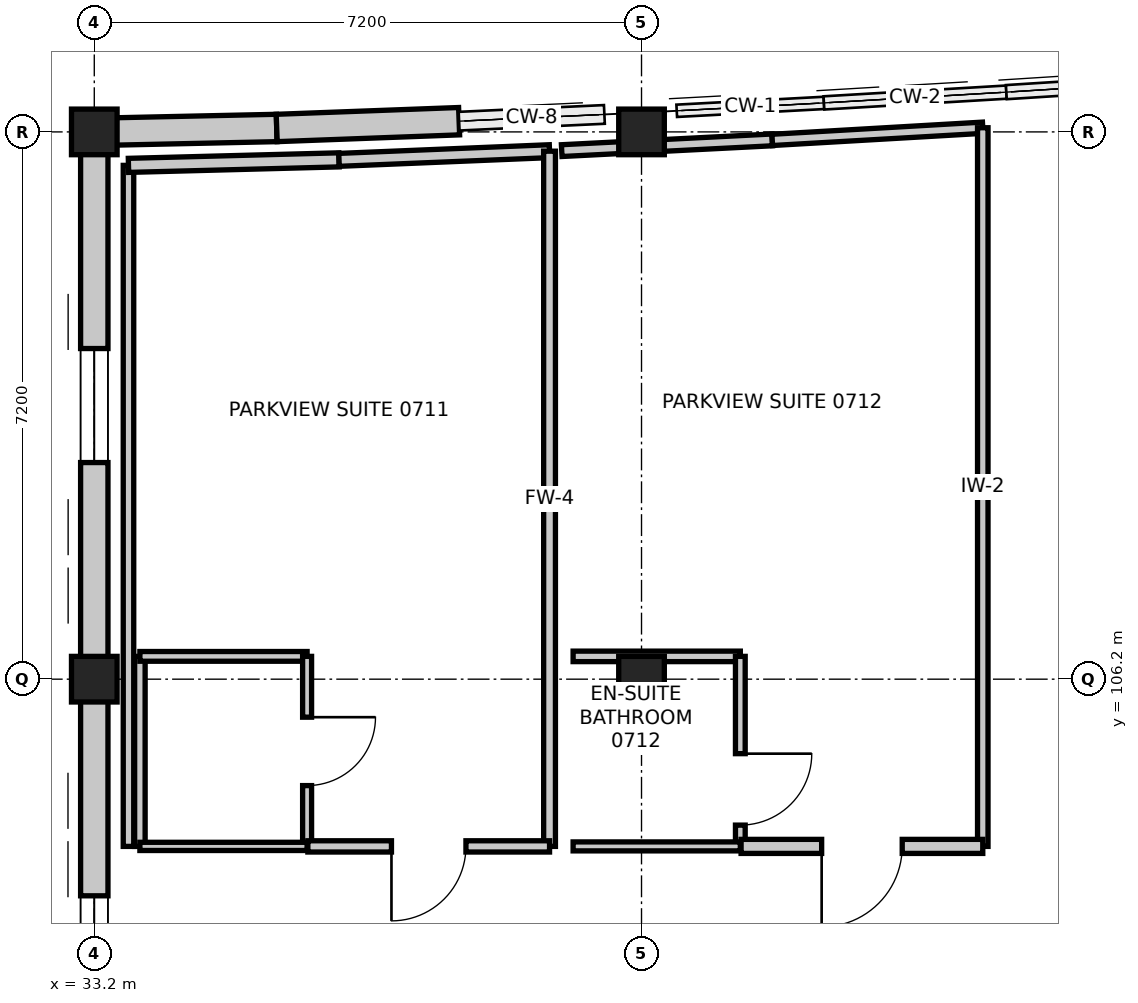
"""IFC4 building model, lengths in metres.
Left out: names, types, materials, properties, quantities, classifications, styles, units other than length and angle.
Written with IfcOpenShell. Run it as: python <this file> out.ifc"""

import sys

from ifc_helpers import new_model, si_unit, direction, frame, frame_2d, origin, origin_2d, place, context, subcontext, project, spatial, rectangle, extrude, element, fill, save


model = new_model("IFC4")
c1 = context("Model", 3, precision=1e-05, world=origin(), true_north=direction((0.0, 1.0)))
c2 = subcontext(c1, "Body", "Model", "MODEL_VIEW")
j1 = project(units=[si_unit("LENGTHUNIT", "METRE"), si_unit("PLANEANGLEUNIT", "RADIAN")], contexts=[c1])
p1 = place(None, origin())
s1 = spatial("IfcSite", under=j1, at=p1, CompositionType="ELEMENT")
p2 = place(p1, origin())
s2 = spatial("IfcBuilding", under=s1, at=p2, CompositionType="ELEMENT")
p3 = place(p2, frame((0.0, 0.0, 30.0)))
s3 = spatial("IfcBuildingStorey", under=s2, at=p3, CompositionType="ELEMENT", Elevation=30.0)
for number, where, z_axis, x_axis in (
    (1, (33.2, 106.2, 0.0), (0.0, 0.0, 1.0), (1.0, 0.0, 0.0)),
    (2, (33.2, 113.4, 0.0), (0.0, 0.0, 1.0), (1.0, 0.0, 0.0)),
    (3, (40.4, 106.2, 0.0), (0.0, 0.0, 1.0), (1.0, 0.0, 0.0)),
    (4, (40.4, 113.4, 0.0), (0.0, 0.0, 1.0), (1.0, 0.0, 0.0)),
):
    element("IfcColumn", number, at=place(p3, frame(where, z_axis=z_axis, x_axis=x_axis)), inside=s3, PredefinedType="COLUMN", context=c2, shape_type="SweptSolid", body=[
        extrude(rectangle(XDim=0.6, YDim=0.6, at=origin_2d()), origin(), (0.0, 0.0, 1.0), 3.6),
    ])
p4 = place(p3, frame((33.2, 113.4, 0.0), z_axis=(0.0, 0.0, 1.0), x_axis=(0.999767568547, 0.021559426766, 0.0)))
e5 = element("IfcWall", 5, at=p4, inside=s3, PredefinedType="STANDARD", context=c2, shape_type="SweptSolid", body=[
    extrude(rectangle(XDim=2.401, YDim=0.36, at=frame_2d((1.2, 0.0))), origin(), (0.0, 0.0, 1.0), 2.745),
])
p5 = place(p3, frame((35.6, 113.452, 0.0), z_axis=(0.0, 0.0, 1.0), x_axis=(0.99930757318, 0.037207179225, 0.0)))
e6 = element("IfcWall", 6, at=p5, inside=s3, PredefinedType="STANDARD", context=c2, shape_type="SweptSolid", body=[
    extrude(rectangle(XDim=2.402, YDim=0.36, at=frame_2d((1.201, 0.0))), origin(), (0.0, 0.0, 1.0), 2.745),
])
p6 = place(p3, frame((33.2, 99.0, 0.0), z_axis=(0.0, 0.0, 1.0), x_axis=(0.0, 1.0, 0.0)))
e7 = element("IfcWall", 7, at=p6, inside=s3, PredefinedType="STANDARD", context=c2, shape_type="SweptSolid", body=[
    extrude(rectangle(XDim=7.2, YDim=0.36, at=frame_2d((3.6, 0.0))), origin(), (0.0, 0.0, 1.0), 2.695),
])
p7 = place(p6, frame((2.85, 0.0, 0.75)))
e8 = element("IfcOpeningElement", 8, at=p7, cuts=e7, PredefinedType="OPENING", context=c2, shape_type="SweptSolid", body=[
    extrude(rectangle(XDim=1.5, YDim=1.5, at=frame_2d((0.75, 0.75))), frame((0.0, 0.19, 0.0), z_axis=(0.0, -1.0, 0.0), x_axis=(1.0, 0.0, 0.0)), (0.0, 0.0, 1.0), 0.38),
])
p8 = place(p3, frame((33.2, 106.2, 0.0), z_axis=(0.0, 0.0, 1.0), x_axis=(0.0, 1.0, 0.0)))
e9 = element("IfcWall", 9, at=p8, inside=s3, PredefinedType="STANDARD", context=c2, shape_type="SweptSolid", body=[
    extrude(rectangle(XDim=7.2, YDim=0.36, at=frame_2d((3.6, 0.0))), origin(), (0.0, 0.0, 1.0), 2.695),
])
p9 = place(p8, frame((2.85, 0.0, 0.75)))
e10 = element("IfcOpeningElement", 10, at=p9, cuts=e9, PredefinedType="OPENING", context=c2, shape_type="SweptSolid", body=[
    extrude(rectangle(XDim=1.5, YDim=1.5, at=frame_2d((0.75, 0.75))), frame((0.0, 0.19, 0.0), z_axis=(0.0, -1.0, 0.0), x_axis=(1.0, 0.0, 0.0)), (0.0, 0.0, 1.0), 0.38),
])
p10 = place(p3, frame((33.8, 104.0, 0.0), z_axis=(0.0, 0.0, 1.0), x_axis=(0.0, 1.0, 0.0)))
e11 = element("IfcWall", 11, at=p10, inside=s3, PredefinedType="PARTITIONING", context=c2, shape_type="SweptSolid", body=[
    extrude(rectangle(XDim=2.5, YDim=0.138, at=frame_2d((1.25, 0.0))), origin(), (0.0, 0.0, 1.0), 2.745),
])
p11 = place(p3, frame((33.8, 106.5, 0.0), z_axis=(0.0, 0.0, 1.0), x_axis=(1.0, 0.0, 0.0)))
e12 = element("IfcWall", 12, at=p11, inside=s3, PredefinedType="PARTITIONING", context=c2, shape_type="SweptSolid", body=[
    extrude(rectangle(XDim=2.2, YDim=0.128, at=frame_2d((1.1, 0.0))), origin(), (0.0, 0.0, 1.0), 3.36),
])
p12 = place(p3, frame((36.0, 106.5, 0.0), z_axis=(0.0, 0.0, 1.0), x_axis=(0.0, -1.0, 0.0)))
e13 = element("IfcWall", 13, at=p12, inside=s3, PredefinedType="PARTITIONING", context=c2, shape_type="SweptSolid", body=[
    extrude(rectangle(XDim=2.5, YDim=0.118, at=frame_2d((1.25, 0.0))), origin(), (0.0, 0.0, 1.0), 2.745),
])
p13 = place(p12, frame((0.8, 0.0, 0.0)))
e14 = element("IfcOpeningElement", 14, at=p13, cuts=e13, PredefinedType="OPENING", context=c2, shape_type="SweptSolid", body=[
    extrude(rectangle(XDim=0.9, YDim=2.08, at=frame_2d((0.45, 1.04))), frame((0.0, 0.069, 0.0), z_axis=(0.0, -1.0, 0.0), x_axis=(1.0, 0.0, 0.0)), (0.0, 0.0, 1.0), 0.138),
])
p14 = place(p3, frame((36.0, 104.0, 0.0), z_axis=(0.0, 0.0, 1.0), x_axis=(-1.0, 0.0, 0.0)))
e15 = element("IfcWall", 15, at=p14, inside=s3, PredefinedType="PARTITIONING", context=c2, shape_type="SweptSolid", body=[
    extrude(rectangle(XDim=2.2, YDim=0.108, at=frame_2d((1.1, 0.0))), origin(), (0.0, 0.0, 1.0), 3.36),
])
p15 = place(p3, frame((33.65, 104.0, 0.0), z_axis=(0.0, 0.0, 1.0), x_axis=(0.0, 1.0, 0.0)))
e16 = element("IfcWall", 16, at=p15, inside=s3, PredefinedType="PARTITIONING", context=c2, shape_type="SweptSolid", body=[
    extrude(rectangle(XDim=8.96, YDim=0.138, at=frame_2d((4.48, 0.0))), origin(), (0.0, 0.0, 1.0), 2.745),
])
p16 = place(p3, frame((33.65, 112.96, 0.0), z_axis=(0.0, 0.0, 1.0), x_axis=(0.999657568092, 0.026167662412, 0.0)))
e17 = element("IfcWall", 17, at=p16, inside=s3, PredefinedType="PARTITIONING", context=c2, shape_type="SweptSolid", body=[
    extrude(rectangle(XDim=2.771, YDim=0.185, at=frame_2d((1.385, 0.0))), origin(), (0.0, 0.0, 1.0), 3.36),
])
p17 = place(p3, frame((36.42, 113.032, 0.0), z_axis=(0.0, 0.0, 1.0), x_axis=(0.999150384548, 0.04121297197, 0.0)))
e18 = element("IfcWall", 18, at=p17, inside=s3, PredefinedType="PARTITIONING", context=c2, shape_type="SweptSolid", body=[
    extrude(rectangle(XDim=2.772, YDim=0.17, at=frame_2d((1.386, 0.0))), origin(), (0.0, 0.0, 1.0), 2.745),
])
p18 = place(p3, frame((39.19, 113.146, 0.0), z_axis=(0.0, 0.0, 1.0), x_axis=(0.0, -1.0, 0.0)))
e19 = element("IfcWall", 19, at=p18, inside=s3, PredefinedType="PARTITIONING", context=c2, shape_type="SweptSolid", body=[
    extrude(rectangle(XDim=9.146, YDim=0.155, at=frame_2d((4.573, 0.0))), origin(), (0.0, 0.0, 1.0), 2.745),
])
p19 = place(p3, frame((39.19, 104.0, 0.0), z_axis=(0.0, 0.0, 1.0), x_axis=(-1.0, 0.0, 0.0)))
e20 = element("IfcWall", 20, at=p19, inside=s3, PredefinedType="PARTITIONING", context=c2, shape_type="SweptSolid", body=[
    extrude(rectangle(XDim=3.18, YDim=0.148, at=frame_2d((1.59, 0.0))), origin(), (0.0, 0.0, 1.0), 3.36),
])
p20 = place(p19, frame((1.1, 0.0, 0.0)))
e21 = element("IfcOpeningElement", 21, at=p20, cuts=e20, PredefinedType="OPENING", context=c2, shape_type="SweptSolid", body=[
    extrude(rectangle(XDim=0.98, YDim=2.15, at=frame_2d((0.49, 1.075))), frame((0.0, 0.084, 0.0), z_axis=(0.0, -1.0, 0.0), x_axis=(1.0, 0.0, 0.0)), (0.0, 0.0, 1.0), 0.168),
])
p21 = place(p3, frame((39.5, 106.5, 0.0), z_axis=(0.0, 0.0, 1.0), x_axis=(1.0, 0.0, 0.0)))
e22 = element("IfcWall", 22, at=p21, inside=s3, PredefinedType="PARTITIONING", context=c2, shape_type="SweptSolid", body=[
    extrude(rectangle(XDim=2.2, YDim=0.138, at=frame_2d((1.1, 0.0))), origin(), (0.0, 0.0, 1.0), 2.695),
])
p22 = place(p3, frame((41.7, 106.5, 0.0), z_axis=(0.0, 0.0, 1.0), x_axis=(0.0, -1.0, 0.0)))
e23 = element("IfcWall", 23, at=p22, inside=s3, PredefinedType="PARTITIONING", context=c2, shape_type="SweptSolid", body=[
    extrude(rectangle(XDim=2.5, YDim=0.128, at=frame_2d((1.25, 0.0))), origin(), (0.0, 0.0, 1.0), 2.745),
])
p23 = place(p22, frame((1.28, 0.0, 0.0)))
e24 = element("IfcOpeningElement", 24, at=p23, cuts=e23, PredefinedType="OPENING", context=c2, shape_type="SweptSolid", body=[
    extrude(rectangle(XDim=0.94, YDim=2.12, at=frame_2d((0.47, 1.06))), frame((0.0, 0.074, 0.0), z_axis=(0.0, -1.0, 0.0), x_axis=(1.0, 0.0, 0.0)), (0.0, 0.0, 1.0), 0.148),
])
p24 = place(p3, frame((41.7, 104.0, 0.0), z_axis=(0.0, 0.0, 1.0), x_axis=(-1.0, 0.0, 0.0)))
e25 = element("IfcWall", 25, at=p24, inside=s3, PredefinedType="PARTITIONING", context=c2, shape_type="SweptSolid", body=[
    extrude(rectangle(XDim=2.2, YDim=0.118, at=frame_2d((1.1, 0.0))), origin(), (0.0, 0.0, 1.0), 2.695),
])
p25 = place(p3, frame((39.35, 113.154, 0.0), z_axis=(0.0, 0.0, 1.0), x_axis=(0.998704922324, 0.05087708841, 0.0)))
e26 = element("IfcWall", 26, at=p25, inside=s3, PredefinedType="PARTITIONING", context=c2, shape_type="SweptSolid", body=[
    extrude(rectangle(XDim=2.774, YDim=0.155, at=frame_2d((1.387, 0.0))), origin(), (0.0, 0.0, 1.0), 2.695),
])
p26 = place(p3, frame((42.12, 113.295, 0.0), z_axis=(0.0, 0.0, 1.0), x_axis=(0.998337508109, 0.057638701438, 0.0)))
e27 = element("IfcWall", 27, at=p26, inside=s3, PredefinedType="PARTITIONING", context=c2, shape_type="SweptSolid", body=[
    extrude(rectangle(XDim=2.774, YDim=0.148, at=frame_2d((1.387, 0.0))), origin(), (0.0, 0.0, 1.0), 2.745),
])
p27 = place(p3, frame((44.89, 113.455, 0.0), z_axis=(0.0, 0.0, 1.0), x_axis=(0.0, -1.0, 0.0)))
e28 = element("IfcWall", 28, at=p27, inside=s3, PredefinedType="PARTITIONING", context=c2, shape_type="SweptSolid", body=[
    extrude(rectangle(XDim=9.455, YDim=0.138, at=frame_2d((4.728, 0.0))), origin(), (0.0, 0.0, 1.0), 2.745),
])
p28 = place(p3, frame((44.89, 104.0, 0.0), z_axis=(0.0, 0.0, 1.0), x_axis=(-1.0, 0.0, 0.0)))
e29 = element("IfcWall", 29, at=p28, inside=s3, PredefinedType="PARTITIONING", context=c2, shape_type="SweptSolid", body=[
    extrude(rectangle(XDim=3.18, YDim=0.185, at=frame_2d((1.59, 0.0))), origin(), (0.0, 0.0, 1.0), 3.36),
])
p29 = place(p28, frame((1.06, 0.0, 0.0)))
e30 = element("IfcOpeningElement", 30, at=p29, cuts=e29, PredefinedType="OPENING", context=c2, shape_type="SweptSolid", body=[
    extrude(rectangle(XDim=1.06, YDim=2.2, at=frame_2d((0.53, 1.1))), frame((0.0, 0.103, 0.0), z_axis=(0.0, -1.0, 0.0), x_axis=(1.0, 0.0, 0.0)), (0.0, 0.0, 1.0), 0.205),
])
p30 = place(p7, origin())
e31 = element("IfcWindow", 31, at=p30, inside=s3, PartitioningType="SINGLE_PANEL", PredefinedType="WINDOW", context=c2, shape_type="SweptSolid", body=[
    extrude(rectangle(XDim=1.5, YDim=1.5, at=frame_2d((0.75, 0.75))), frame((0.0, 0.03, 0.0), z_axis=(0.0, -1.0, 0.0), x_axis=(1.0, 0.0, 0.0)), (0.0, 0.0, 1.0), 0.06),
])
fill(e8, e31)
p31 = place(p9, origin())
e32 = element("IfcWindow", 32, at=p31, inside=s3, PartitioningType="SINGLE_PANEL", PredefinedType="WINDOW", context=c2, shape_type="SweptSolid", body=[
    extrude(rectangle(XDim=1.5, YDim=1.5, at=frame_2d((0.75, 0.75))), frame((0.0, 0.03, 0.0), z_axis=(0.0, -1.0, 0.0), x_axis=(1.0, 0.0, 0.0)), (0.0, 0.0, 1.0), 0.06),
])
fill(e10, e32)
p32 = place(p13, origin())
e33 = element("IfcDoor", 33, at=p32, inside=s3, OperationType="SINGLE_SWING_LEFT", PredefinedType="DOOR", context=c2, shape_type="SweptSolid", body=[
    extrude(rectangle(XDim=0.9, YDim=2.08, at=frame_2d((0.45, 1.04))), frame((0.0, 0.025, 0.0), z_axis=(0.0, -1.0, 0.0), x_axis=(1.0, 0.0, 0.0)), (0.0, 0.0, 1.0), 0.05),
])
fill(e14, e33)
p33 = place(p20, origin())
e34 = element("IfcDoor", 34, at=p33, inside=s3, OperationType="SINGLE_SWING_RIGHT", PredefinedType="DOOR", context=c2, shape_type="SweptSolid", body=[
    extrude(rectangle(XDim=0.98, YDim=2.15, at=frame_2d((0.49, 1.075))), frame((0.0, 0.025, 0.0), z_axis=(0.0, -1.0, 0.0), x_axis=(1.0, 0.0, 0.0)), (0.0, 0.0, 1.0), 0.05),
])
fill(e21, e34)
p34 = place(p23, origin())
e35 = element("IfcDoor", 35, at=p34, inside=s3, OperationType="SINGLE_SWING_LEFT", PredefinedType="DOOR", context=c2, shape_type="SweptSolid", body=[
    extrude(rectangle(XDim=0.94, YDim=2.12, at=frame_2d((0.47, 1.06))), frame((0.0, 0.025, 0.0), z_axis=(0.0, -1.0, 0.0), x_axis=(1.0, 0.0, 0.0)), (0.0, 0.0, 1.0), 0.05),
])
fill(e24, e35)
p35 = place(p29, origin())
e36 = element("IfcDoor", 36, at=p35, inside=s3, OperationType="SINGLE_SWING_RIGHT", PredefinedType="DOOR", context=c2, shape_type="SweptSolid", body=[
    extrude(rectangle(XDim=1.06, YDim=2.2, at=frame_2d((0.53, 1.1))), frame((0.0, 0.025, 0.0), z_axis=(0.0, -1.0, 0.0), x_axis=(1.0, 0.0, 0.0)), (0.0, 0.0, 1.0), 0.05),
])
fill(e30, e36)
save(model, sys.argv[1])
